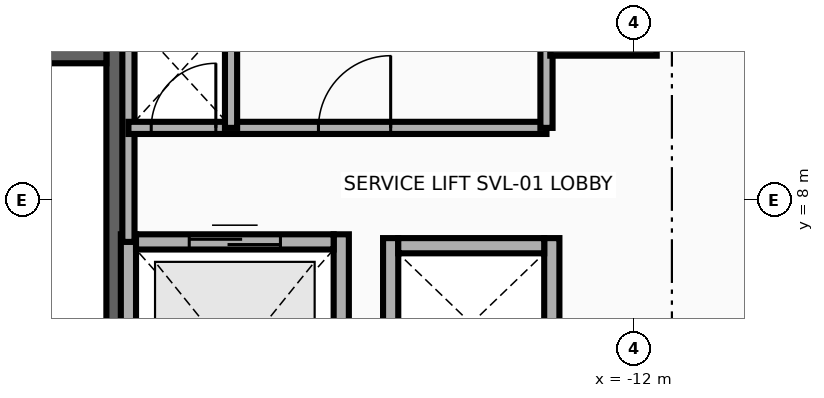
"""IFC4 building model, lengths in metres.
Left out: names, types, materials, properties, quantities, classifications, styles, units other than length and angle.
Written with IfcOpenShell. Run it as: python <this file> out.ifc"""

import sys

from ifc_helpers import new_model, si_unit, direction, frame, frame_2d, origin, origin_2d, place, context, subcontext, project, spatial, rectangle, extrude, source, transform, mapped, element, fill, save


model = new_model("IFC4")
c1 = context("Model", 3, precision=1e-05, world=origin(), true_north=direction((0.0, 1.0)))
c2 = subcontext(c1, "Body", "Model", "MODEL_VIEW")
j1 = project(units=[si_unit("LENGTHUNIT", "METRE"), si_unit("PLANEANGLEUNIT", "RADIAN")], contexts=[c1])
p1 = place(None, origin())
s1 = spatial("IfcSite", under=j1, at=p1, CompositionType="ELEMENT")
p2 = place(p1, origin())
s2 = spatial("IfcBuilding", under=s1, at=p2, CompositionType="ELEMENT")
p3 = place(p2, frame((0.0, 0.0, 37.1)))
s3 = spatial("IfcBuildingStorey", under=s2, at=p3, CompositionType="ELEMENT", Elevation=37.1)
p4 = place(p3, frame((-18.83, 1.78, 0.0), z_axis=(0.0, 0.0, 1.0), x_axis=(0.0, 1.0, 0.0)))
e1 = element("IfcWall", 1, at=p4, inside=s3, PredefinedType="SHEAR", context=c2, shape_type="SweptSolid", body=[
    extrude(rectangle(XDim=8.67, YDim=0.22, at=frame_2d((4.335, 0.0))), origin(), (0.0, 0.0, 1.0), 3.46),
])
p5 = place(p3, frame((-22.05, 9.91, 0.0), z_axis=(0.0, 0.0, 1.0), x_axis=(1.0, 0.0, 0.0)))
e2 = element("IfcWall", 2, at=p5, inside=s3, PredefinedType="SHEAR", context=c2, shape_type="SweptSolid", body=[
    extrude(rectangle(XDim=3.11, YDim=0.22, at=frame_2d((1.555, 0.0))), origin(), (0.0, 0.0, 1.0), 3.46),
])
m1 = source(origin(), c2, "Body", "SweptSolid", [
    extrude(rectangle(XDim=1.4, YDim=1.4, at=origin_2d()), origin(), (0.0, 0.0, 1.0), 3.7),
])
p6 = place(p3, frame((-12.4, 10.6, 0.0), z_axis=(0.0, 0.0, 1.0), x_axis=(1.0, 0.0, 0.0)))
e3 = element("IfcColumn", 3, at=p6, inside=s3, PredefinedType="COLUMN", context=c2, shape_type="MappedRepresentation", body=[
    mapped(m1, transform((0.0, 0.0, 0.0), x_axis=(1.0, 0.0, 0.0), y_axis=(0.0, 1.0, 0.0), z_axis=(0.0, 0.0, 1.0), scale=1.0)),
])
for number, where, z_axis, x_axis in (
    (4, (-18.65, 4.225, 0.0), (0.0, 0.0, 1.0), (0.0, 1.0, 0.0)),
    (5, (-15.85, 4.225, 0.0), (0.0, 0.0, 1.0), (0.0, 1.0, 0.0)),
):
    element("IfcWall", number, at=place(p3, frame(where, z_axis=z_axis, x_axis=x_axis)), inside=s3, PredefinedType="MOVABLE", context=c2, shape_type="SweptSolid", body=[
        extrude(rectangle(XDim=3.325, YDim=0.2, at=frame_2d((1.663, 0.0))), origin(), (0.0, 0.0, 1.0), 3.46),
    ])
p7 = place(p3, frame((-18.55, 7.45, 0.0), z_axis=(0.0, 0.0, 1.0), x_axis=(1.0, 0.0, 0.0)))
e6 = element("IfcWall", 6, at=p7, inside=s3, PredefinedType="MOVABLE", context=c2, shape_type="SweptSolid", body=[
    extrude(rectangle(XDim=2.6, YDim=0.2, at=frame_2d((1.3, 0.0))), origin(), (0.0, 0.0, 1.0), 3.46),
])
p8 = place(p7, frame((0.7, 0.0, 0.0)))
e7 = element("IfcOpeningElement", 7, at=p8, cuts=e6, PredefinedType="OPENING", context=c2, shape_type="SweptSolid", body=[
    extrude(rectangle(XDim=1.2, YDim=2.1, at=frame_2d((0.6, 1.05))), frame((0.0, 0.115, 0.0), z_axis=(0.0, -1.0, 0.0), x_axis=(1.0, 0.0, 0.0)), (0.0, 0.0, 1.0), 0.23),
])
for number, where, z_axis, x_axis in (
    (8, (-15.2, 5.25, 0.0), (0.0, 0.0, 1.0), (0.0, 1.0, 0.0)),
    (9, (-13.08, 5.25, 0.0), (0.0, 0.0, 1.0), (0.0, 1.0, 0.0)),
):
    element("IfcWall", number, at=place(p3, frame(where, z_axis=z_axis, x_axis=x_axis)), inside=s3, PredefinedType="MOVABLE", context=c2, shape_type="SweptSolid", body=[
        extrude(rectangle(XDim=2.25, YDim=0.2, at=frame_2d((1.125, 0.0))), origin(), (0.0, 0.0, 1.0), 3.46),
    ])
p9 = place(p3, frame((-15.1, 7.4, 0.0), z_axis=(0.0, 0.0, 1.0), x_axis=(1.0, 0.0, 0.0)))
e10 = element("IfcWall", 10, at=p9, inside=s3, PredefinedType="MOVABLE", context=c2, shape_type="SweptSolid", body=[
    extrude(rectangle(XDim=1.92, YDim=0.2, at=frame_2d((0.96, 0.0))), origin(), (0.0, 0.0, 1.0), 3.46),
])
p10 = place(p3, frame((-18.65, 7.45, 0.0), z_axis=(0.0, 0.0, 1.0), x_axis=(0.0, 1.0, 0.0)))
e11 = element("IfcWall", 11, at=p10, inside=s3, PredefinedType="PARTITIONING", context=c2, shape_type="SweptSolid", body=[
    extrude(rectangle(XDim=2.93, YDim=0.16, at=frame_2d((1.465, 0.0))), origin(), (0.0, 0.0, 1.0), 3.46),
])
p11 = place(p3, frame((-18.65, 8.95, 0.0), z_axis=(0.0, 0.0, 1.0), x_axis=(1.0, 0.0, 0.0)))
e12 = element("IfcWall", 12, at=p11, inside=s3, PredefinedType="PARTITIONING", context=c2, shape_type="SweptSolid", body=[
    extrude(rectangle(XDim=5.5, YDim=0.16, at=frame_2d((2.75, 0.0))), origin(), (0.0, 0.0, 1.0), 3.46),
])
p12 = place(p11, frame((0.3, 0.0, 0.0)))
e13 = element("IfcOpeningElement", 13, at=p12, cuts=e12, PredefinedType="OPENING", context=c2, shape_type="SweptSolid", body=[
    extrude(rectangle(XDim=0.85, YDim=2.05, at=frame_2d((0.425, 1.025))), frame((0.0, 0.095, 0.0), z_axis=(0.0, -1.0, 0.0), x_axis=(1.0, 0.0, 0.0)), (0.0, 0.0, 1.0), 0.19),
])
p13 = place(p11, frame((2.5, 0.0, 0.0)))
e14 = element("IfcOpeningElement", 14, at=p13, cuts=e12, PredefinedType="OPENING", context=c2, shape_type="SweptSolid", body=[
    extrude(rectangle(XDim=0.95, YDim=2.15, at=frame_2d((0.475, 1.075))), frame((0.0, 0.095, 0.0), z_axis=(0.0, -1.0, 0.0), x_axis=(1.0, 0.0, 0.0)), (0.0, 0.0, 1.0), 0.19),
])
for number, where, z_axis, x_axis in (
    (15, (-13.15, 8.95, 0.0), (0.0, 0.0, 1.0), (0.0, 1.0, 0.0)),
    (16, (-17.3, 8.95, 0.0), (0.0, 0.0, 1.0), (0.0, 1.0, 0.0)),
):
    element("IfcWall", number, at=place(p3, frame(where, z_axis=z_axis, x_axis=x_axis)), inside=s3, PredefinedType="PARTITIONING", context=c2, shape_type="SweptSolid", body=[
        extrude(rectangle(XDim=1.43, YDim=0.16, at=frame_2d((0.715, 0.0))), origin(), (0.0, 0.0, 1.0), 3.46),
    ])
p14 = place(p8, origin())
e17 = element("IfcDoor", 17, at=p14, inside=s3, OperationType="DOUBLE_DOOR_SLIDING", PredefinedType="DOOR", context=c2, shape_type="SweptSolid", body=[
    extrude(rectangle(XDim=1.2, YDim=2.1, at=frame_2d((0.6, 1.05))), frame((0.0, 0.025, 0.0), z_axis=(0.0, -1.0, 0.0), x_axis=(1.0, 0.0, 0.0)), (0.0, 0.0, 1.0), 0.05),
])
fill(e7, e17)
p15 = place(p12, origin())
e18 = element("IfcDoor", 18, at=p15, inside=s3, OperationType="SINGLE_SWING_LEFT", PredefinedType="DOOR", context=c2, shape_type="SweptSolid", body=[
    extrude(rectangle(XDim=0.85, YDim=2.05, at=frame_2d((0.425, 1.025))), frame((0.0, 0.025, 0.0), z_axis=(0.0, -1.0, 0.0), x_axis=(1.0, 0.0, 0.0)), (0.0, 0.0, 1.0), 0.05),
])
fill(e13, e18)
p16 = place(p13, origin())
e19 = element("IfcDoor", 19, at=p16, inside=s3, OperationType="SINGLE_SWING_RIGHT", PredefinedType="DOOR", context=c2, shape_type="SweptSolid", body=[
    extrude(rectangle(XDim=0.95, YDim=2.15, at=frame_2d((0.475, 1.075))), frame((0.0, 0.025, 0.0), z_axis=(0.0, -1.0, 0.0), x_axis=(1.0, 0.0, 0.0)), (0.0, 0.0, 1.0), 0.05),
])
fill(e14, e19)
save(model, sys.argv[1])
